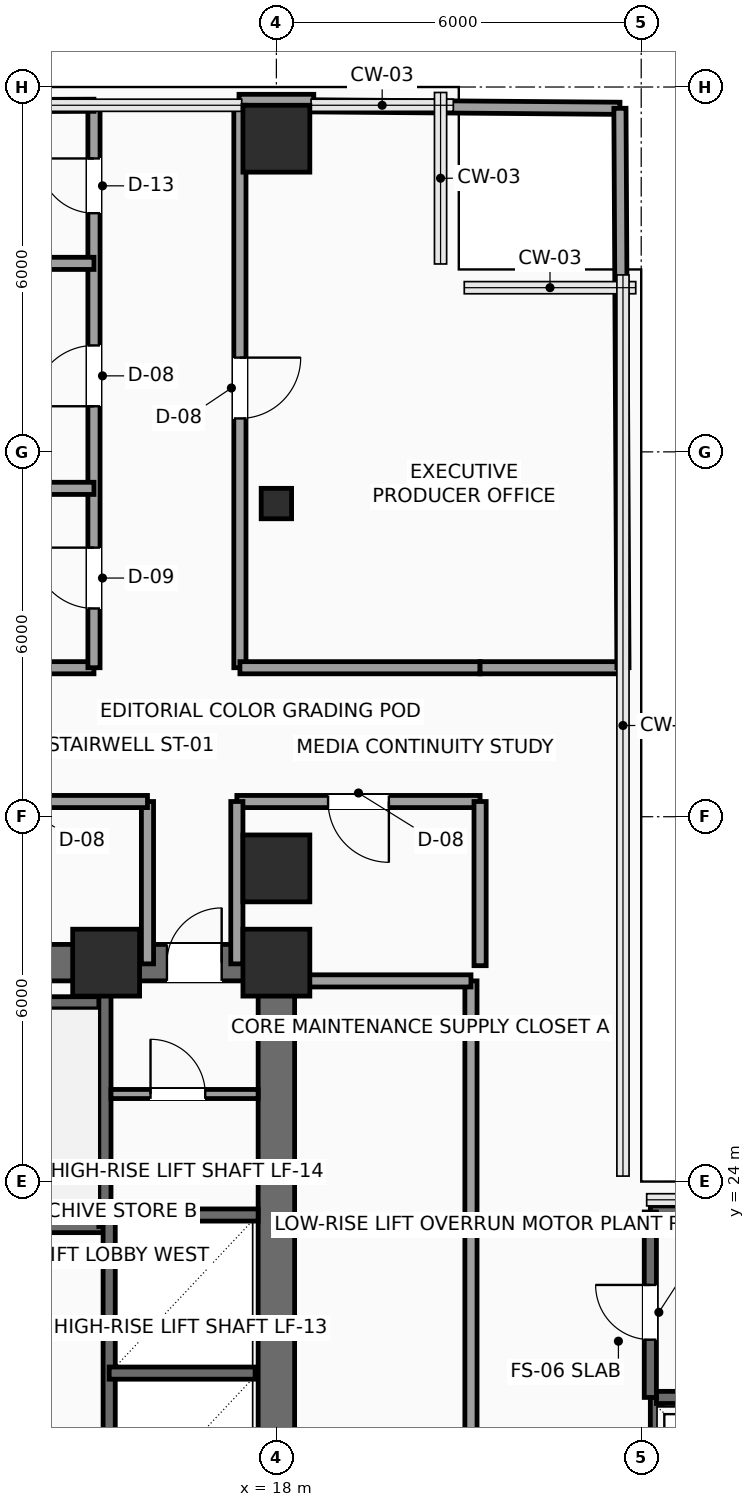
"""IFC4 building model, lengths in metres.
Left out: names, types, materials, properties, quantities, classifications, styles, units other than length and angle.
Written with IfcOpenShell. Run it as: python <this file> out.ifc"""

import sys

from ifc_helpers import new_model, si_unit, direction, frame, frame_2d, origin, origin_2d, place, context, subcontext, project, spatial, rectangle, hollow_rectangle, extrude, element, fill, save


model = new_model("IFC4")
c1 = context("Model", 3, precision=1e-05, world=origin(), true_north=direction((0.0, 1.0)))
c2 = subcontext(c1, "Body", "Model", "MODEL_VIEW")
j1 = project(units=[si_unit("LENGTHUNIT", "METRE"), si_unit("PLANEANGLEUNIT", "RADIAN")], contexts=[c1])
p1 = place(None, origin())
s1 = spatial("IfcSite", under=j1, at=p1, CompositionType="ELEMENT")
p2 = place(p1, origin())
s2 = spatial("IfcBuilding", under=s1, at=p2, CompositionType="ELEMENT")
p3 = place(p2, frame((0.0, 0.0, 115.65)))
s3 = spatial("IfcBuildingStorey", under=s2, at=p3, CompositionType="ELEMENT", Elevation=115.65)
for number, where, z_axis, x_axis in (
    (1, (15.2, 27.6, 0.0), (0.0, 0.0, 1.0), (1.0, 0.0, 0.0)),
    (2, (18.0, 27.6, 0.0), (0.0, 0.0, 1.0), (1.0, 0.0, 0.0)),
    (3, (18.0, 29.15, 0.0), (0.0, 0.0, 1.0), (1.0, 0.0, 0.0)),
):
    element("IfcColumn", number, at=place(p3, frame(where, z_axis=z_axis, x_axis=x_axis)), inside=s3, PredefinedType="COLUMN", context=c2, shape_type="SweptSolid", body=[
        extrude(rectangle(XDim=1.1, YDim=1.1, at=origin_2d()), origin(), (0.0, 0.0, 1.0), 3.75),
    ])
p4 = place(p3, frame((18.0, 35.15, 0.0), z_axis=(0.0, 0.0, 1.0), x_axis=(1.0, 0.0, 0.0)))
e4 = element("IfcColumn", 4, at=p4, inside=s3, PredefinedType="COLUMN", context=c2, shape_type="SweptSolid", body=[
    extrude(hollow_rectangle(XDim=0.5, YDim=0.5, WallThickness=0.025, InnerFilletRadius=0.025, OuterFilletRadius=0.04, at=origin_2d()), origin(), (0.0, 0.0, 1.0), 3.75),
])
p5 = place(p3, frame((18.0, 41.15, 0.0), z_axis=(0.0, 0.0, 1.0), x_axis=(1.0, 0.0, 0.0)))
e5 = element("IfcColumn", 5, at=p5, inside=s3, PredefinedType="COLUMN", context=c2, shape_type="SweptSolid", body=[
    extrude(rectangle(XDim=1.1, YDim=1.1, at=origin_2d()), origin(), (0.0, 0.0, 1.0), 3.75),
])
p6 = place(p3, frame((17.385, 41.76, 0.0), z_axis=(0.0, 0.0, 1.0), x_axis=(1.0, 0.0, 0.0)))
e6 = element("IfcWall", 6, at=p6, inside=s3, PredefinedType="SOLIDWALL", context=c2, shape_type="SweptSolid", body=[
    extrude(rectangle(XDim=1.23, YDim=0.24, at=frame_2d((0.615, 0.0))), origin(), (0.0, 0.0, 1.0), 3.525),
])
p7 = place(p3, frame((6.0, 27.6, 0.0), z_axis=(0.0, 0.0, 1.0), x_axis=(1.0, 0.0, 0.0)))
e7 = element("IfcWall", 7, at=p7, inside=s3, PredefinedType="SHEAR", context=c2, shape_type="SweptSolid", body=[
    extrude(rectangle(XDim=12.0, YDim=0.6, at=frame_2d((6.0, 0.0))), origin(), (0.0, 0.0, 1.0), 3.525),
])
p8 = place(p7, frame((10.2, 0.0, 0.0)))
e8 = element("IfcOpeningElement", 8, at=p8, cuts=e7, PredefinedType="OPENING", context=c2, shape_type="SweptSolid", body=[
    extrude(rectangle(XDim=0.9, YDim=2.15, at=frame_2d((0.45, 1.075))), frame((0.0, 0.31, 0.0), z_axis=(0.0, -1.0, 0.0), x_axis=(1.0, 0.0, 0.0)), (0.0, 0.0, 1.0), 0.62),
])
p9 = place(p3, frame((18.0, 18.0, 0.0), z_axis=(0.0, 0.0, 1.0), x_axis=(0.0, 1.0, 0.0)))
e9 = element("IfcWall", 9, at=p9, inside=s3, PredefinedType="SHEAR", context=c2, shape_type="SweptSolid", body=[
    extrude(rectangle(XDim=9.6, YDim=0.6, at=frame_2d((4.8, 0.0))), origin(), (0.0, 0.0, 1.0), 3.525),
])
p10 = place(p3, frame((6.3, 23.26, 0.0), z_axis=(0.0, 0.0, 1.0), x_axis=(1.0, 0.0, 0.0)))
e10 = element("IfcWall", 10, at=p10, inside=s3, PredefinedType="SHEAR", context=c2, shape_type="SweptSolid", body=[
    extrude(rectangle(XDim=8.88, YDim=0.2, at=frame_2d((4.44, 0.0))), origin(), (0.0, 0.0, 1.0), 3.525),
])
p11 = place(p10, frame((0.35, 0.0, 0.0)))
e11 = element("IfcOpeningElement", 11, at=p11, cuts=e10, PredefinedType="OPENING", context=c2, shape_type="SweptSolid", body=[
    extrude(rectangle(XDim=1.1, YDim=2.2, at=frame_2d((0.55, 1.1))), frame((0.0, 0.11, 0.0), z_axis=(0.0, -1.0, 0.0), x_axis=(1.0, 0.0, 0.0)), (0.0, 0.0, 1.0), 0.22),
])
p12 = place(p3, frame((6.3, 26.94, 0.0), z_axis=(0.0, 0.0, 1.0), x_axis=(1.0, 0.0, 0.0)))
e12 = element("IfcWall", 12, at=p12, inside=s3, PredefinedType="SHEAR", context=c2, shape_type="SweptSolid", body=[
    extrude(rectangle(XDim=8.88, YDim=0.2, at=frame_2d((4.44, 0.0))), origin(), (0.0, 0.0, 1.0), 3.525),
])
p13 = place(p3, frame((15.18, 23.26, 0.0), z_axis=(0.0, 0.0, 1.0), x_axis=(0.0, 1.0, 0.0)))
e13 = element("IfcWall", 13, at=p13, inside=s3, PredefinedType="SHEAR", context=c2, shape_type="SweptSolid", body=[
    extrude(rectangle(XDim=4.04, YDim=0.2, at=frame_2d((2.02, 0.0))), origin(), (0.0, 0.0, 1.0), 3.525),
])
p14 = place(p3, frame((15.25, 18.25, 0.0), z_axis=(0.0, 0.0, 1.0), x_axis=(0.0, 1.0, 0.0)))
e14 = element("IfcWall", 14, at=p14, inside=s3, PredefinedType="SHEAR", context=c2, shape_type="SweptSolid", body=[
    extrude(rectangle(XDim=5.2, YDim=0.2, at=frame_2d((2.6, 0.0))), origin(), (0.0, 0.0, 1.0), 3.525),
])
p15 = place(p3, frame((15.25, 20.85, 0.0), z_axis=(0.0, 0.0, 1.0), x_axis=(1.0, 0.0, 0.0)))
e15 = element("IfcWall", 15, at=p15, inside=s3, PredefinedType="SHEAR", context=c2, shape_type="SweptSolid", body=[
    extrude(rectangle(XDim=2.4, YDim=0.2, at=frame_2d((1.2, 0.0))), origin(), (0.0, 0.0, 1.0), 3.525),
])
p16 = place(p3, frame((15.25, 23.45, 0.0), z_axis=(0.0, 0.0, 1.0), x_axis=(1.0, 0.0, 0.0)))
e16 = element("IfcWall", 16, at=p16, inside=s3, PredefinedType="SHEAR", context=c2, shape_type="SweptSolid", body=[
    extrude(rectangle(XDim=2.45, YDim=0.2, at=frame_2d((1.225, 0.0))), origin(), (0.0, 0.0, 1.0), 3.525),
])
p17 = place(p3, frame((15.28, 25.44, 0.0), z_axis=(0.0, 0.0, 1.0), x_axis=(1.0, 0.0, 0.0)))
e17 = element("IfcWall", 17, at=p17, inside=s3, PredefinedType="PARTITIONING", context=c2, shape_type="SweptSolid", body=[
    extrude(rectangle(XDim=2.42, YDim=0.15, at=frame_2d((1.21, 0.0))), origin(), (0.0, 0.0, 1.0), 3.525),
])
p18 = place(p17, frame((0.65, 0.0, 0.0)))
e18 = element("IfcOpeningElement", 18, at=p18, cuts=e17, PredefinedType="OPENING", context=c2, shape_type="SweptSolid", body=[
    extrude(rectangle(XDim=0.9, YDim=2.15, at=frame_2d((0.45, 1.075))), frame((0.0, 0.085, 0.0), z_axis=(0.0, -1.0, 0.0), x_axis=(1.0, 0.0, 0.0)), (0.0, 0.0, 1.0), 0.17),
])
p19 = place(p3, frame((21.2, 18.0, 0.0), z_axis=(0.0, 0.0, 1.0), x_axis=(0.0, 1.0, 0.0)))
e19 = element("IfcWall", 19, at=p19, inside=s3, PredefinedType="SOLIDWALL", context=c2, shape_type="SweptSolid", body=[
    extrude(rectangle(XDim=9.3, YDim=0.2, at=frame_2d((4.65, 0.0))), origin(), (0.0, 0.0, 1.0), 3.525),
])
p20 = place(p3, frame((18.1, 27.3, 0.0), z_axis=(0.0, 0.0, 1.0), x_axis=(1.0, 0.0, 0.0)))
e20 = element("IfcWall", 20, at=p20, inside=s3, PredefinedType="SOLIDWALL", context=c2, shape_type="SweptSolid", body=[
    extrude(rectangle(XDim=3.1, YDim=0.2, at=frame_2d((1.55, 0.0))), origin(), (0.0, 0.0, 1.0), 3.525),
])
p21 = place(p3, frame((24.25, 18.1, 0.0), z_axis=(0.0, 0.0, 1.0), x_axis=(0.0, 1.0, 0.0)))
e21 = element("IfcWall", 21, at=p21, inside=s3, PredefinedType="SHEAR", context=c2, shape_type="SweptSolid", body=[
    extrude(rectangle(XDim=2.35, YDim=0.2, at=frame_2d((1.175, 0.0))), origin(), (0.0, 0.0, 1.0), 3.525),
])
p22 = place(p3, frame((24.25, 20.45, 0.0), z_axis=(0.0, 0.0, 1.0), x_axis=(1.0, 0.0, 0.0)))
e22 = element("IfcWall", 22, at=p22, inside=s3, PredefinedType="SHEAR", context=c2, shape_type="SweptSolid", body=[
    extrude(rectangle(XDim=9.05, YDim=0.2, at=frame_2d((4.525, 0.0))), origin(), (0.0, 0.0, 1.0), 3.525),
])
p23 = place(p22, frame((0.4, 0.0, 0.0)))
e23 = element("IfcOpeningElement", 23, at=p23, cuts=e22, PredefinedType="OPENING", context=c2, shape_type="SweptSolid", body=[
    extrude(rectangle(XDim=1.2, YDim=2.2, at=frame_2d((0.6, 1.1))), frame((0.0, 0.11, 0.0), z_axis=(0.0, -1.0, 0.0), x_axis=(1.0, 0.0, 0.0)), (0.0, 0.0, 1.0), 0.22),
])
p24 = place(p22, frame((2.65, 0.0, 0.0)))
e24 = element("IfcOpeningElement", 24, at=p24, cuts=e22, PredefinedType="OPENING", context=c2, shape_type="SweptSolid", body=[
    extrude(rectangle(XDim=1.2, YDim=2.2, at=frame_2d((0.6, 1.1))), frame((0.0, 0.11, 0.0), z_axis=(0.0, -1.0, 0.0), x_axis=(1.0, 0.0, 0.0)), (0.0, 0.0, 1.0), 0.22),
])
p25 = place(p22, frame((4.9, 0.0, 0.0)))
e25 = element("IfcOpeningElement", 25, at=p25, cuts=e22, PredefinedType="OPENING", context=c2, shape_type="SweptSolid", body=[
    extrude(rectangle(XDim=1.2, YDim=2.2, at=frame_2d((0.6, 1.1))), frame((0.0, 0.11, 0.0), z_axis=(0.0, -1.0, 0.0), x_axis=(1.0, 0.0, 0.0)), (0.0, 0.0, 1.0), 0.22),
])
p26 = place(p22, frame((7.15, 0.0, 0.0)))
e26 = element("IfcOpeningElement", 26, at=p26, cuts=e22, PredefinedType="OPENING", context=c2, shape_type="SweptSolid", body=[
    extrude(rectangle(XDim=1.2, YDim=2.2, at=frame_2d((0.6, 1.1))), frame((0.0, 0.11, 0.0), z_axis=(0.0, -1.0, 0.0), x_axis=(1.0, 0.0, 0.0)), (0.0, 0.0, 1.0), 0.22),
])
p27 = place(p3, frame((24.15, 23.5, 0.0), z_axis=(0.0, 0.0, 1.0), x_axis=(1.0, 0.0, 0.0)))
e27 = element("IfcWall", 27, at=p27, inside=s3, PredefinedType="SHEAR", context=c2, shape_type="SweptSolid", body=[
    extrude(rectangle(XDim=9.15, YDim=0.2, at=frame_2d((4.575, 0.0))), origin(), (0.0, 0.0, 1.0), 3.525),
])
p28 = place(p3, frame((24.15, 20.45, 0.0), z_axis=(0.0, 0.0, 1.0), x_axis=(0.0, 1.0, 0.0)))
e28 = element("IfcWall", 28, at=p28, inside=s3, PredefinedType="SHEAR", context=c2, shape_type="SweptSolid", body=[
    extrude(rectangle(XDim=3.05, YDim=0.2, at=frame_2d((1.525, 0.0))), origin(), (0.0, 0.0, 1.0), 3.525),
])
p29 = place(p28, frame((0.95, 0.0, 0.0)))
e29 = element("IfcOpeningElement", 29, at=p29, cuts=e28, PredefinedType="OPENING", context=c2, shape_type="SweptSolid", body=[
    extrude(rectangle(XDim=0.9, YDim=2.15, at=frame_2d((0.45, 1.075))), frame((0.0, 0.11, 0.0), z_axis=(0.0, -1.0, 0.0), x_axis=(1.0, 0.0, 0.0)), (0.0, 0.0, 1.0), 0.22),
])
p30 = place(p3, frame((21.35, 30.25, 0.0), z_axis=(0.0, 0.0, 1.0), x_axis=(-1.0, 0.0, 0.0)))
e30 = element("IfcWall", 30, at=p30, inside=s3, PredefinedType="SOLIDWALL", context=c2, shape_type="SweptSolid", body=[
    extrude(rectangle(XDim=4.0, YDim=0.2, at=frame_2d((2.0, 0.0))), origin(), (0.0, 0.0, 1.0), 3.525),
])
p31 = place(p30, frame((1.5, 0.0, 0.0)))
e31 = element("IfcOpeningElement", 31, at=p31, cuts=e30, PredefinedType="OPENING", context=c2, shape_type="SweptSolid", body=[
    extrude(rectangle(XDim=1.0, YDim=2.2, at=frame_2d((0.5, 1.1))), frame((0.0, 0.11, 0.0), z_axis=(0.0, -1.0, 0.0), x_axis=(1.0, 0.0, 0.0)), (0.0, 0.0, 1.0), 0.22),
])
for number, where, z_axis, x_axis in (
    (32, (17.35, 30.25, 0.0), (0.0, 0.0, 1.0), (0.0, -1.0, 0.0)),
    (33, (15.88, 27.58, 0.0), (0.0, 0.0, 1.0), (0.0, 1.0, 0.0)),
):
    element("IfcWall", number, at=place(p3, frame(where, z_axis=z_axis, x_axis=x_axis)), inside=s3, PredefinedType="SOLIDWALL", context=c2, shape_type="SweptSolid", body=[
        extrude(rectangle(XDim=2.67, YDim=0.2, at=frame_2d((1.335, 0.0))), origin(), (0.0, 0.0, 1.0), 3.525),
    ])
p32 = place(p3, frame((15.88, 30.25, 0.0), z_axis=(0.0, 0.0, 1.0), x_axis=(-1.0, 0.0, 0.0)))
e34 = element("IfcWall", 34, at=p32, inside=s3, PredefinedType="SOLIDWALL", context=c2, shape_type="SweptSolid", body=[
    extrude(rectangle(XDim=15.58, YDim=0.2, at=frame_2d((7.79, 0.0))), origin(), (0.0, 0.0, 1.0), 3.525),
])
p33 = place(p32, frame((12.23, 0.0, 0.0)))
e35 = element("IfcOpeningElement", 35, at=p33, cuts=e34, PredefinedType="OPENING", context=c2, shape_type="SweptSolid", body=[
    extrude(rectangle(XDim=1.0, YDim=2.2, at=frame_2d((0.5, 1.1))), frame((0.0, 0.11, 0.0), z_axis=(0.0, -1.0, 0.0), x_axis=(1.0, 0.0, 0.0)), (0.0, 0.0, 1.0), 0.22),
])
p34 = place(p32, frame((6.68, 0.0, 0.0)))
e36 = element("IfcOpeningElement", 36, at=p34, cuts=e34, PredefinedType="OPENING", context=c2, shape_type="SweptSolid", body=[
    extrude(rectangle(XDim=1.0, YDim=2.2, at=frame_2d((0.5, 1.1))), frame((0.0, 0.11, 0.0), z_axis=(0.0, -1.0, 0.0), x_axis=(1.0, 0.0, 0.0)), (0.0, 0.0, 1.0), 0.22),
])
p35 = place(p32, frame((1.93, 0.0, 0.0)))
e37 = element("IfcOpeningElement", 37, at=p35, cuts=e34, PredefinedType="OPENING", context=c2, shape_type="SweptSolid", body=[
    extrude(rectangle(XDim=1.0, YDim=2.2, at=frame_2d((0.5, 1.1))), frame((0.0, 0.11, 0.0), z_axis=(0.0, -1.0, 0.0), x_axis=(1.0, 0.0, 0.0)), (0.0, 0.0, 1.0), 0.22),
])
p36 = place(p3, frame((0.3, 32.45, 0.0), z_axis=(0.0, 0.0, 1.0), x_axis=(1.0, 0.0, 0.0)))
e38 = element("IfcWall", 38, at=p36, inside=s3, PredefinedType="SOLIDWALL", context=c2, shape_type="SweptSolid", body=[
    extrude(rectangle(XDim=14.7, YDim=0.2, at=frame_2d((7.35, 0.0))), origin(), (0.0, 0.0, 1.0), 3.525),
])
p37 = place(p3, frame((15.0, 32.45, 0.0), z_axis=(0.0, 0.0, 1.0), x_axis=(0.0, 1.0, 0.0)))
e39 = element("IfcWall", 39, at=p37, inside=s3, PredefinedType="SOLIDWALL", context=c2, shape_type="SweptSolid", body=[
    extrude(rectangle(XDim=9.25, YDim=0.2, at=frame_2d((4.625, 0.0))), origin(), (0.0, 0.0, 1.0), 3.525),
])
p38 = place(p37, frame((0.975, 0.0, 0.0)))
e40 = element("IfcOpeningElement", 40, at=p38, cuts=e39, PredefinedType="OPENING", context=c2, shape_type="SweptSolid", body=[
    extrude(rectangle(XDim=1.0, YDim=2.2, at=frame_2d((0.5, 1.1))), frame((0.0, 0.11, 0.0), z_axis=(0.0, -1.0, 0.0), x_axis=(1.0, 0.0, 0.0)), (0.0, 0.0, 1.0), 0.22),
])
p39 = place(p37, frame((4.3, 0.0, 0.0)))
e41 = element("IfcOpeningElement", 41, at=p39, cuts=e39, PredefinedType="OPENING", context=c2, shape_type="SweptSolid", body=[
    extrude(rectangle(XDim=1.0, YDim=2.2, at=frame_2d((0.5, 1.1))), frame((0.0, 0.11, 0.0), z_axis=(0.0, -1.0, 0.0), x_axis=(1.0, 0.0, 0.0)), (0.0, 0.0, 1.0), 0.22),
])
p40 = place(p37, frame((7.475, 0.0, 0.0)))
e42 = element("IfcOpeningElement", 42, at=p40, cuts=e39, PredefinedType="OPENING", context=c2, shape_type="SweptSolid", body=[
    extrude(rectangle(XDim=0.9, YDim=2.1, at=frame_2d((0.45, 1.05))), frame((0.0, 0.11, 0.0), z_axis=(0.0, -1.0, 0.0), x_axis=(1.0, 0.0, 0.0)), (0.0, 0.0, 1.0), 0.22),
])
p41 = place(p3, frame((17.4, 41.7, 0.0), z_axis=(0.0, 0.0, 1.0), x_axis=(0.0, -1.0, 0.0)))
e43 = element("IfcWall", 43, at=p41, inside=s3, PredefinedType="SOLIDWALL", context=c2, shape_type="SweptSolid", body=[
    extrude(rectangle(XDim=9.25, YDim=0.2, at=frame_2d((4.625, 0.0))), origin(), (0.0, 0.0, 1.0), 3.525),
])
p42 = place(p41, frame((4.15, 0.0, 0.0)))
e44 = element("IfcOpeningElement", 44, at=p42, cuts=e43, PredefinedType="OPENING", context=c2, shape_type="SweptSolid", body=[
    extrude(rectangle(XDim=1.0, YDim=2.2, at=frame_2d((0.5, 1.1))), frame((0.0, 0.11, 0.0), z_axis=(0.0, -1.0, 0.0), x_axis=(1.0, 0.0, 0.0)), (0.0, 0.0, 1.0), 0.22),
])
p43 = place(p3, frame((17.4, 32.45, 0.0), z_axis=(0.0, 0.0, 1.0), x_axis=(1.0, 0.0, 0.0)))
e45 = element("IfcWall", 45, at=p43, inside=s3, PredefinedType="SOLIDWALL", context=c2, shape_type="SweptSolid", body=[
    extrude(rectangle(XDim=3.95, YDim=0.2, at=frame_2d((1.975, 0.0))), origin(), (0.0, 0.0, 1.0), 3.525),
])
p44 = place(p3, frame((21.35, 32.45, 0.0), z_axis=(0.0, 0.0, 1.0), x_axis=(1.0, 0.0, 0.0)))
e46 = element("IfcWall", 46, at=p44, inside=s3, PredefinedType="SOLIDWALL", context=c2, shape_type="SweptSolid", body=[
    extrude(rectangle(XDim=2.35, YDim=0.2, at=frame_2d((1.175, 0.0))), origin(), (0.0, 0.0, 1.0), 3.525),
])
p45 = place(p3, frame((21.35, 27.55, 0.0), z_axis=(0.0, 0.0, 1.0), x_axis=(0.0, 1.0, 0.0)))
e47 = element("IfcWall", 47, at=p45, inside=s3, PredefinedType="PARTITIONING", context=c2, shape_type="SweptSolid", body=[
    extrude(rectangle(XDim=2.7, YDim=0.2, at=frame_2d((1.35, 0.0))), origin(), (0.0, 0.0, 1.0), 3.525),
])
p46 = place(p3, frame((0.3, 35.4, 0.0), z_axis=(0.0, 0.0, 1.0), x_axis=(1.0, 0.0, 0.0)))
e48 = element("IfcWall", 48, at=p46, inside=s3, PredefinedType="PARTITIONING", context=c2, shape_type="SweptSolid", body=[
    extrude(rectangle(XDim=14.7, YDim=0.2, at=frame_2d((7.35, 0.0))), origin(), (0.0, 0.0, 1.0), 3.017),
])
p47 = place(p3, frame((0.35, 39.1, 0.0), z_axis=(0.0, 0.0, 1.0), x_axis=(1.0, 0.0, 0.0)))
e49 = element("IfcWall", 49, at=p47, inside=s3, PredefinedType="PARTITIONING", context=c2, shape_type="SweptSolid", body=[
    extrude(rectangle(XDim=14.65, YDim=0.2, at=frame_2d((7.325, 0.0))), origin(), (0.0, 0.0, 1.0), 3.525),
])
p48 = place(p3, frame((6.615, 41.671, 0.0), z_axis=(0.0, 0.0, 1.0), x_axis=(0.999994197557, 0.003406589638, 0.0)))
e50 = element("IfcWall", 50, at=p48, inside=s3, PredefinedType="PARTITIONING", context=c2, shape_type="SweptSolid", body=[
    extrude(rectangle(XDim=8.385, YDim=0.2, at=frame_2d((4.192, 0.0))), origin(), (0.0, 0.0, 1.0), 3.525),
])
p49 = place(p3, frame((18.615, 41.69, 0.0), z_axis=(0.0, 0.0, 1.0), x_axis=(0.99996799533, -0.008000519771, 0.0)))
e51 = element("IfcWall", 51, at=p49, inside=s3, PredefinedType="PARTITIONING", context=c2, shape_type="SweptSolid", body=[
    extrude(rectangle(XDim=5.035, YDim=0.2, at=frame_2d((2.518, 0.0))), origin(), (0.0, 0.0, 1.0), 3.525),
])
p50 = place(p3, frame((23.7, 32.45, 0.0), z_axis=(0.0, 0.0, 1.0), x_axis=(-0.005440038388, 0.999985202882, 0.0)))
e52 = element("IfcWall", 52, at=p50, inside=s3, PredefinedType="PARTITIONING", context=c2, shape_type="SweptSolid", body=[
    extrude(rectangle(XDim=9.2, YDim=0.2, at=frame_2d((4.6, 0.0))), origin(), (0.0, 0.0, 1.0), 3.525),
])
p51 = place(p8, origin())
e53 = element("IfcDoor", 53, at=p51, inside=s3, OperationType="SINGLE_SWING_RIGHT", PredefinedType="DOOR", context=c2, shape_type="SweptSolid", body=[
    extrude(rectangle(XDim=0.9, YDim=2.15, at=frame_2d((0.45, 1.075))), frame((0.0, 0.025, 0.0), z_axis=(0.0, -1.0, 0.0), x_axis=(1.0, 0.0, 0.0)), (0.0, 0.0, 1.0), 0.05),
])
fill(e8, e53)
p52 = place(p18, origin())
e54 = element("IfcDoor", 54, at=p52, inside=s3, OperationType="SINGLE_SWING_LEFT", PredefinedType="DOOR", context=c2, shape_type="SweptSolid", body=[
    extrude(rectangle(XDim=0.9, YDim=2.15, at=frame_2d((0.45, 1.075))), frame((0.0, 0.025, 0.0), z_axis=(0.0, -1.0, 0.0), x_axis=(1.0, 0.0, 0.0)), (0.0, 0.0, 1.0), 0.05),
])
fill(e18, e54)
p53 = place(p29, origin())
e55 = element("IfcDoor", 55, at=p53, inside=s3, OperationType="SINGLE_SWING_RIGHT", PredefinedType="DOOR", context=c2, shape_type="SweptSolid", body=[
    extrude(rectangle(XDim=0.9, YDim=2.15, at=frame_2d((0.45, 1.075))), frame((0.0, 0.025, 0.0), z_axis=(0.0, -1.0, 0.0), x_axis=(1.0, 0.0, 0.0)), (0.0, 0.0, 1.0), 0.05),
])
fill(e29, e55)
p54 = place(p31, origin())
e56 = element("IfcDoor", 56, at=p54, inside=s3, OperationType="SINGLE_SWING_LEFT", PredefinedType="DOOR", context=c2, shape_type="SweptSolid", body=[
    extrude(rectangle(XDim=1.0, YDim=2.2, at=frame_2d((0.5, 1.1))), frame((0.0, 0.025, 0.0), z_axis=(0.0, -1.0, 0.0), x_axis=(1.0, 0.0, 0.0)), (0.0, 0.0, 1.0), 0.05),
])
fill(e31, e56)
p55 = place(p38, origin())
e57 = element("IfcDoor", 57, at=p55, inside=s3, OperationType="SINGLE_SWING_RIGHT", PredefinedType="DOOR", context=c2, shape_type="SweptSolid", body=[
    extrude(rectangle(XDim=1.0, YDim=2.2, at=frame_2d((0.5, 1.1))), frame((0.0, 0.025, 0.0), z_axis=(0.0, -1.0, 0.0), x_axis=(1.0, 0.0, 0.0)), (0.0, 0.0, 1.0), 0.05),
])
fill(e40, e57)
p56 = place(p39, origin())
e58 = element("IfcDoor", 58, at=p56, inside=s3, OperationType="SINGLE_SWING_LEFT", PredefinedType="DOOR", context=c2, shape_type="SweptSolid", body=[
    extrude(rectangle(XDim=1.0, YDim=2.2, at=frame_2d((0.5, 1.1))), frame((0.0, 0.025, 0.0), z_axis=(0.0, -1.0, 0.0), x_axis=(1.0, 0.0, 0.0)), (0.0, 0.0, 1.0), 0.05),
])
fill(e41, e58)
p57 = place(p40, origin())
e59 = element("IfcDoor", 59, at=p57, inside=s3, OperationType="SINGLE_SWING_RIGHT", PredefinedType="DOOR", context=c2, shape_type="SweptSolid", body=[
    extrude(rectangle(XDim=0.9, YDim=2.1, at=frame_2d((0.45, 1.05))), frame((0.0, 0.025, 0.0), z_axis=(0.0, -1.0, 0.0), x_axis=(1.0, 0.0, 0.0)), (0.0, 0.0, 1.0), 0.05),
])
fill(e42, e59)
p58 = place(p42, origin())
e60 = element("IfcDoor", 60, at=p58, inside=s3, OperationType="SINGLE_SWING_LEFT", PredefinedType="DOOR", context=c2, shape_type="SweptSolid", body=[
    extrude(rectangle(XDim=1.0, YDim=2.2, at=frame_2d((0.5, 1.1))), frame((0.0, 0.025, 0.0), z_axis=(0.0, -1.0, 0.0), x_axis=(1.0, 0.0, 0.0)), (0.0, 0.0, 1.0), 0.05),
])
fill(e44, e60)
save(model, sys.argv[1])
